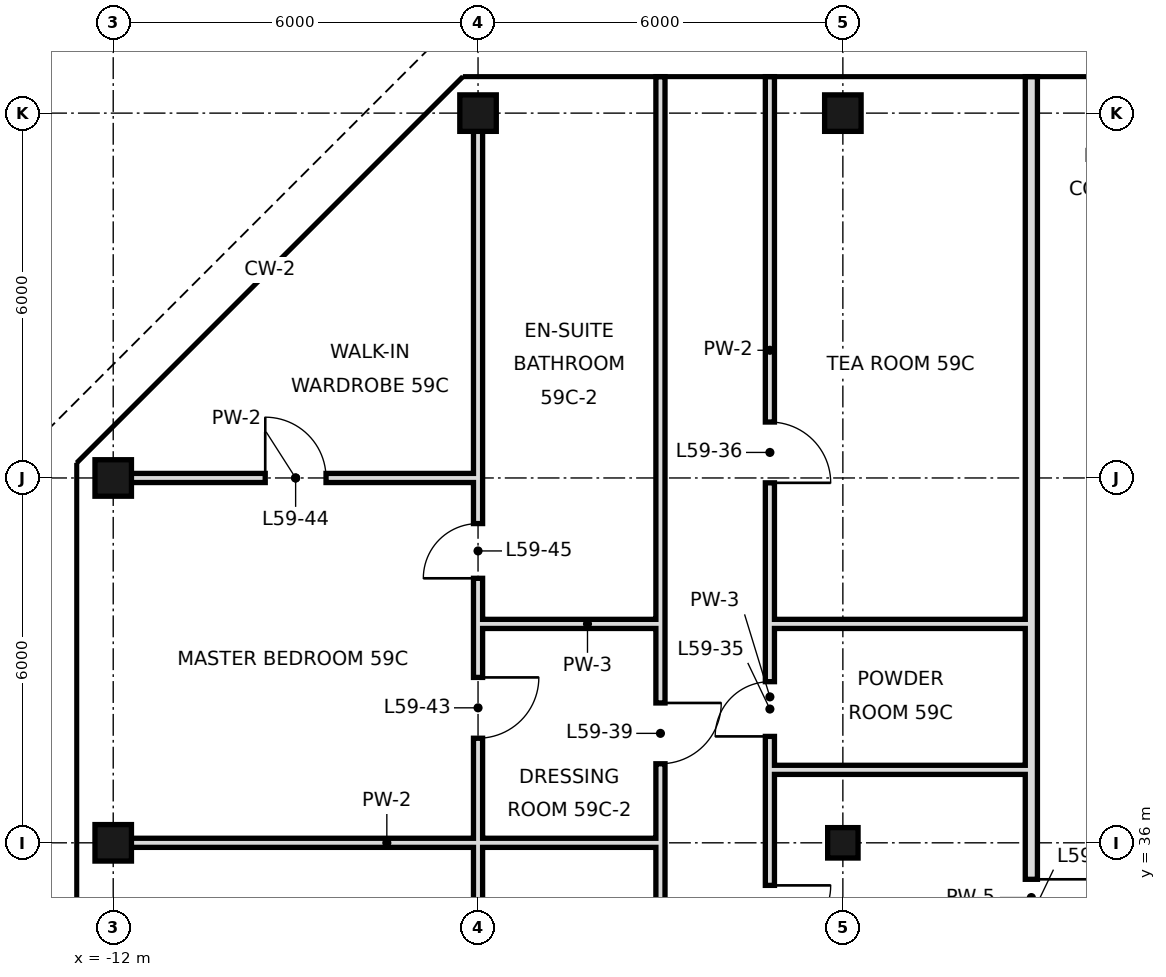
"""IFC4 building model, lengths in metres.
Left out: names, types, materials, properties, quantities, classifications, styles, units other than length and angle.
Written with IfcOpenShell. Run it as: python <this file> out.ifc"""

import sys

from ifc_helpers import new_model, si_unit, direction, frame, frame_2d, origin, origin_2d, place, context, subcontext, project, spatial, rectangle, hollow_rectangle, extrude, element, fill, save


model = new_model("IFC4")
c1 = context("Model", 3, precision=1e-05, world=origin(), true_north=direction((0.0, 1.0)))
c2 = subcontext(c1, "Body", "Model", "MODEL_VIEW")
j1 = project(units=[si_unit("LENGTHUNIT", "METRE"), si_unit("PLANEANGLEUNIT", "RADIAN")], contexts=[c1])
p1 = place(None, origin())
s1 = spatial("IfcSite", under=j1, at=p1, CompositionType="ELEMENT")
p2 = place(p1, origin())
s2 = spatial("IfcBuilding", under=s1, at=p2, CompositionType="ELEMENT")
p3 = place(p2, frame((0.0, 0.0, 250.4)))
s3 = spatial("IfcBuildingStorey", under=s2, at=p3, CompositionType="ELEMENT", Elevation=250.4)
for number, where, z_axis, x_axis in (
    (1, (-12.0, 36.0, 0.0), (0.0, 0.0, 1.0), (1.0, 0.0, 0.0)),
    (2, (-12.0, 42.0, 0.0), (0.0, 0.0, 1.0), (1.0, 0.0, 0.0)),
    (3, (-6.0, 48.0, 0.0), (0.0, 0.0, 1.0), (1.0, 0.0, 0.0)),
):
    element("IfcColumn", number, at=place(p3, frame(where, z_axis=z_axis, x_axis=x_axis)), inside=s3, PredefinedType="COLUMN", context=c2, shape_type="SweptSolid", body=[
        extrude(hollow_rectangle(XDim=0.6, YDim=0.6, WallThickness=0.028, at=origin_2d()), origin(), (0.0, 0.0, 1.0), 3.6),
    ])
p4 = place(p3, frame((0.0, 36.0, 0.0), z_axis=(0.0, 0.0, 1.0), x_axis=(1.0, 0.0, 0.0)))
e4 = element("IfcColumn", 4, at=p4, inside=s3, PredefinedType="COLUMN", context=c2, shape_type="SweptSolid", body=[
    extrude(hollow_rectangle(XDim=0.5, YDim=0.5, WallThickness=0.025, at=origin_2d()), origin(), (0.0, 0.0, 1.0), 3.6),
])
p5 = place(p3, frame((0.0, 48.0, 0.0), z_axis=(0.0, 0.0, 1.0), x_axis=(1.0, 0.0, 0.0)))
e5 = element("IfcColumn", 5, at=p5, inside=s3, PredefinedType="COLUMN", context=c2, shape_type="SweptSolid", body=[
    extrude(hollow_rectangle(XDim=0.6, YDim=0.6, WallThickness=0.028, at=origin_2d()), origin(), (0.0, 0.0, 1.0), 3.6),
])
p6 = place(p3, frame((-1.2, 21.6, 0.0), z_axis=(0.0, 0.0, 1.0), x_axis=(0.0, 1.0, 0.0)))
e6 = element("IfcWall", 6, at=p6, inside=s3, PredefinedType="PARTITIONING", context=c2, shape_type="SweptSolid", body=[
    extrude(rectangle(XDim=15.6, YDim=0.15, at=frame_2d((7.8, 0.0))), origin(), (0.0, 0.0, 1.0), 3.42),
])
p7 = place(p6, frame((12.7, 0.0, 0.0)))
e7 = element("IfcOpeningElement", 7, at=p7, cuts=e6, PredefinedType="OPENING", context=c2, shape_type="SweptSolid", body=[
    extrude(rectangle(XDim=1.0, YDim=2.4, at=frame_2d((0.5, 1.2))), frame((0.0, 0.085, 0.0), z_axis=(0.0, -1.0, 0.0), x_axis=(1.0, 0.0, 0.0)), (0.0, 0.0, 1.0), 0.17),
])
p8 = place(p6, frame((4.9, 0.0, 0.0)))
e8 = element("IfcOpeningElement", 8, at=p8, cuts=e6, PredefinedType="OPENING", context=c2, shape_type="SweptSolid", body=[
    extrude(rectangle(XDim=1.0, YDim=2.4, at=frame_2d((0.5, 1.2))), frame((0.0, 0.085, 0.0), z_axis=(0.0, -1.0, 0.0), x_axis=(1.0, 0.0, 0.0)), (0.0, 0.0, 1.0), 0.17),
])
p9 = place(p3, frame((-1.2, 39.6, 0.0), z_axis=(0.0, 0.0, 1.0), x_axis=(0.0, 1.0, 0.0)))
e9 = element("IfcWall", 9, at=p9, inside=s3, PredefinedType="PARTITIONING", context=c2, shape_type="SweptSolid", body=[
    extrude(rectangle(XDim=9.0, YDim=0.15, at=frame_2d((4.5, 0.0))), origin(), (0.0, 0.0, 1.0), 3.42),
])
p10 = place(p9, frame((2.32, 0.0, 0.0)))
e10 = element("IfcOpeningElement", 10, at=p10, cuts=e9, PredefinedType="OPENING", context=c2, shape_type="SweptSolid", body=[
    extrude(rectangle(XDim=1.0, YDim=2.4, at=frame_2d((0.5, 1.2))), frame((0.0, 0.085, 0.0), z_axis=(0.0, -1.0, 0.0), x_axis=(1.0, 0.0, 0.0)), (0.0, 0.0, 1.0), 0.17),
])
p11 = place(p3, frame((-1.2, 37.2, 0.0), z_axis=(0.0, 0.0, 1.0), x_axis=(0.0, 1.0, 0.0)))
e11 = element("IfcWall", 11, at=p11, inside=s3, PredefinedType="PARTITIONING", context=c2, shape_type="SweptSolid", body=[
    extrude(rectangle(XDim=2.4, YDim=0.15, at=frame_2d((1.2, 0.0))), origin(), (0.0, 0.0, 1.0), 3.42),
])
p12 = place(p11, frame((0.55, 0.0, 0.0)))
e12 = element("IfcOpeningElement", 12, at=p12, cuts=e11, PredefinedType="OPENING", context=c2, shape_type="SweptSolid", body=[
    extrude(rectangle(XDim=0.9, YDim=2.4, at=frame_2d((0.45, 1.2))), frame((0.0, 0.085, 0.0), z_axis=(0.0, -1.0, 0.0), x_axis=(1.0, 0.0, 0.0)), (0.0, 0.0, 1.0), 0.17),
])
p13 = place(p3, frame((-3.0, 21.6, 0.0), z_axis=(0.0, 0.0, 1.0), x_axis=(0.0, 1.0, 0.0)))
e13 = element("IfcWall", 13, at=p13, inside=s3, PredefinedType="PARTITIONING", context=c2, shape_type="SweptSolid", body=[
    extrude(rectangle(XDim=18.0, YDim=0.15, at=frame_2d((9.0, 0.0))), origin(), (0.0, 0.0, 1.0), 3.42),
])
p14 = place(p13, frame((0.88, 0.0, 0.0)))
e14 = element("IfcOpeningElement", 14, at=p14, cuts=e13, PredefinedType="OPENING", context=c2, shape_type="SweptSolid", body=[
    extrude(rectangle(XDim=1.0, YDim=2.4, at=frame_2d((0.5, 1.2))), frame((0.0, 0.085, 0.0), z_axis=(0.0, -1.0, 0.0), x_axis=(1.0, 0.0, 0.0)), (0.0, 0.0, 1.0), 0.17),
])
p15 = place(p13, frame((9.44, 0.0, 0.0)))
e15 = element("IfcOpeningElement", 15, at=p15, cuts=e13, PredefinedType="OPENING", context=c2, shape_type="SweptSolid", body=[
    extrude(rectangle(XDim=1.8, YDim=2.4, at=frame_2d((0.9, 1.2))), frame((0.0, 0.085, 0.0), z_axis=(0.0, -1.0, 0.0), x_axis=(1.0, 0.0, 0.0)), (0.0, 0.0, 1.0), 0.17),
])
p16 = place(p13, frame((15.7, 0.0, 0.0)))
e16 = element("IfcOpeningElement", 16, at=p16, cuts=e13, PredefinedType="OPENING", context=c2, shape_type="SweptSolid", body=[
    extrude(rectangle(XDim=1.0, YDim=2.4, at=frame_2d((0.5, 1.2))), frame((0.0, 0.085, 0.0), z_axis=(0.0, -1.0, 0.0), x_axis=(1.0, 0.0, 0.0)), (0.0, 0.0, 1.0), 0.17),
])
p17 = place(p3, frame((-3.0, 39.6, 0.0), z_axis=(0.0, 0.0, 1.0), x_axis=(0.0, 1.0, 0.0)))
e17 = element("IfcWall", 17, at=p17, inside=s3, PredefinedType="PARTITIONING", context=c2, shape_type="SweptSolid", body=[
    extrude(rectangle(XDim=9.0, YDim=0.15, at=frame_2d((4.5, 0.0))), origin(), (0.0, 0.0, 1.0), 3.42),
])
p18 = place(p3, frame((-6.0, 21.6, 0.0), z_axis=(0.0, 0.0, 1.0), x_axis=(0.0, 1.0, 0.0)))
e18 = element("IfcWall", 18, at=p18, inside=s3, PredefinedType="PARTITIONING", context=c2, shape_type="SweptSolid", body=[
    extrude(rectangle(XDim=18.0, YDim=0.15, at=frame_2d((9.0, 0.0))), origin(), (0.0, 0.0, 1.0), 3.42),
])
p19 = place(p18, frame((0.52, 0.0, 0.0)))
e19 = element("IfcOpeningElement", 19, at=p19, cuts=e18, PredefinedType="OPENING", context=c2, shape_type="SweptSolid", body=[
    extrude(rectangle(XDim=1.0, YDim=2.4, at=frame_2d((0.5, 1.2))), frame((0.0, 0.085, 0.0), z_axis=(0.0, -1.0, 0.0), x_axis=(1.0, 0.0, 0.0)), (0.0, 0.0, 1.0), 0.17),
])
p20 = place(p18, frame((7.5, 0.0, 0.0)))
e20 = element("IfcOpeningElement", 20, at=p20, cuts=e18, PredefinedType="OPENING", context=c2, shape_type="SweptSolid", body=[
    extrude(rectangle(XDim=1.8, YDim=2.4, at=frame_2d((0.9, 1.2))), frame((0.0, 0.085, 0.0), z_axis=(0.0, -1.0, 0.0), x_axis=(1.0, 0.0, 0.0)), (0.0, 0.0, 1.0), 0.17),
])
p21 = place(p18, frame((16.12, 0.0, 0.0)))
e21 = element("IfcOpeningElement", 21, at=p21, cuts=e18, PredefinedType="OPENING", context=c2, shape_type="SweptSolid", body=[
    extrude(rectangle(XDim=1.0, YDim=2.4, at=frame_2d((0.5, 1.2))), frame((0.0, 0.085, 0.0), z_axis=(0.0, -1.0, 0.0), x_axis=(1.0, 0.0, 0.0)), (0.0, 0.0, 1.0), 0.17),
])
p22 = place(p3, frame((-6.0, 39.6, 0.0), z_axis=(0.0, 0.0, 1.0), x_axis=(0.0, 1.0, 0.0)))
e22 = element("IfcWall", 22, at=p22, inside=s3, PredefinedType="PARTITIONING", context=c2, shape_type="SweptSolid", body=[
    extrude(rectangle(XDim=8.4, YDim=0.15, at=frame_2d((4.2, 0.0))), origin(), (0.0, 0.0, 1.0), 3.42),
])
p23 = place(p22, frame((0.75, 0.0, 0.0)))
e23 = element("IfcOpeningElement", 23, at=p23, cuts=e22, PredefinedType="OPENING", context=c2, shape_type="SweptSolid", body=[
    extrude(rectangle(XDim=0.9, YDim=2.4, at=frame_2d((0.45, 1.2))), frame((0.0, 0.085, 0.0), z_axis=(0.0, -1.0, 0.0), x_axis=(1.0, 0.0, 0.0)), (0.0, 0.0, 1.0), 0.17),
])
p24 = place(p3, frame((3.1, 21.6, 0.0), z_axis=(0.0, 0.0, 1.0), x_axis=(0.0, 1.0, 0.0)))
e24 = element("IfcWall", 24, at=p24, inside=s3, PredefinedType="SOLIDWALL", context=c2, shape_type="SweptSolid", body=[
    extrude(rectangle(XDim=27.0, YDim=0.2, at=frame_2d((13.5, 0.0))), origin(), (0.0, 0.0, 1.0), 2.72),
])
p25 = place(p24, frame((12.6, 0.0, 0.0)))
e25 = element("IfcOpeningElement", 25, at=p25, cuts=e24, PredefinedType="OPENING", context=c2, shape_type="SweptSolid", body=[
    extrude(rectangle(XDim=1.2, YDim=2.4, at=frame_2d((0.6, 1.2))), frame((0.0, 0.11, 0.0), z_axis=(0.0, -1.0, 0.0), x_axis=(1.0, 0.0, 0.0)), (0.0, 0.0, 1.0), 0.22),
])
p26 = place(p3, frame((-12.0, 36.0, 0.0), z_axis=(0.0, 0.0, 1.0), x_axis=(1.0, 0.0, 0.0)))
e26 = element("IfcWall", 26, at=p26, inside=s3, PredefinedType="PARTITIONING", context=c2, shape_type="SweptSolid", body=[
    extrude(rectangle(XDim=9.0, YDim=0.15, at=frame_2d((4.5, 0.0))), origin(), (0.0, 0.0, 1.0), 2.72),
])
p27 = place(p3, frame((-1.2, 37.2, 0.0), z_axis=(0.0, 0.0, 1.0), x_axis=(1.0, 0.0, 0.0)))
e27 = element("IfcWall", 27, at=p27, inside=s3, PredefinedType="PARTITIONING", context=c2, shape_type="SweptSolid", body=[
    extrude(rectangle(XDim=4.3, YDim=0.15, at=frame_2d((2.15, 0.0))), origin(), (0.0, 0.0, 1.0), 3.42),
])
p28 = place(p3, frame((-6.0, 39.6, 0.0), z_axis=(0.0, 0.0, 1.0), x_axis=(1.0, 0.0, 0.0)))
e28 = element("IfcWall", 28, at=p28, inside=s3, PredefinedType="PARTITIONING", context=c2, shape_type="SweptSolid", body=[
    extrude(rectangle(XDim=3.0, YDim=0.15, at=frame_2d((1.5, 0.0))), origin(), (0.0, 0.0, 1.0), 3.42),
])
p29 = place(p3, frame((-1.2, 39.6, 0.0), z_axis=(0.0, 0.0, 1.0), x_axis=(1.0, 0.0, 0.0)))
e29 = element("IfcWall", 29, at=p29, inside=s3, PredefinedType="PARTITIONING", context=c2, shape_type="SweptSolid", body=[
    extrude(rectangle(XDim=4.3, YDim=0.15, at=frame_2d((2.15, 0.0))), origin(), (0.0, 0.0, 1.0), 3.42),
])
p30 = place(p3, frame((-12.0, 42.0, 0.0), z_axis=(0.0, 0.0, 1.0), x_axis=(1.0, 0.0, 0.0)))
e30 = element("IfcWall", 30, at=p30, inside=s3, PredefinedType="PARTITIONING", context=c2, shape_type="SweptSolid", body=[
    extrude(rectangle(XDim=6.0, YDim=0.15, at=frame_2d((3.0, 0.0))), origin(), (0.0, 0.0, 1.0), 2.72),
])
p31 = place(p30, frame((2.5, 0.0, 0.0)))
e31 = element("IfcOpeningElement", 31, at=p31, cuts=e30, PredefinedType="OPENING", context=c2, shape_type="SweptSolid", body=[
    extrude(rectangle(XDim=1.0, YDim=2.4, at=frame_2d((0.5, 1.2))), frame((0.0, 0.085, 0.0), z_axis=(0.0, -1.0, 0.0), x_axis=(1.0, 0.0, 0.0)), (0.0, 0.0, 1.0), 0.17),
])
p32 = place(p7, origin())
e32 = element("IfcDoor", 32, at=p32, inside=s3, OperationType="SINGLE_SWING_RIGHT", PredefinedType="DOOR", context=c2, shape_type="SweptSolid", body=[
    extrude(rectangle(XDim=1.0, YDim=2.4, at=frame_2d((0.5, 1.2))), frame((0.0, 0.025, 0.0), z_axis=(0.0, -1.0, 0.0), x_axis=(1.0, 0.0, 0.0)), (0.0, 0.0, 1.0), 0.05),
])
fill(e7, e32)
p33 = place(p12, origin())
e33 = element("IfcDoor", 33, at=p33, inside=s3, OperationType="SINGLE_SWING_LEFT", PredefinedType="DOOR", context=c2, shape_type="SweptSolid", body=[
    extrude(rectangle(XDim=0.9, YDim=2.4, at=frame_2d((0.45, 1.2))), frame((0.0, 0.025, 0.0), z_axis=(0.0, -1.0, 0.0), x_axis=(1.0, 0.0, 0.0)), (0.0, 0.0, 1.0), 0.05),
])
fill(e12, e33)
p34 = place(p10, frame((1.0, 0.0, 0.0), z_axis=(0.0, 0.0, 1.0), x_axis=(-1.0, 0.0, 0.0)))
e34 = element("IfcDoor", 34, at=p34, inside=s3, OperationType="SINGLE_SWING_RIGHT", PredefinedType="DOOR", context=c2, shape_type="SweptSolid", body=[
    extrude(rectangle(XDim=1.0, YDim=2.4, at=frame_2d((0.5, 1.2))), frame((0.0, 0.025, 0.0), z_axis=(0.0, -1.0, 0.0), x_axis=(1.0, 0.0, 0.0)), (0.0, 0.0, 1.0), 0.05),
])
fill(e10, e34)
p35 = place(p16, origin())
e35 = element("IfcDoor", 35, at=p35, inside=s3, OperationType="SINGLE_SWING_RIGHT", PredefinedType="DOOR", context=c2, shape_type="SweptSolid", body=[
    extrude(rectangle(XDim=1.0, YDim=2.4, at=frame_2d((0.5, 1.2))), frame((0.0, 0.025, 0.0), z_axis=(0.0, -1.0, 0.0), x_axis=(1.0, 0.0, 0.0)), (0.0, 0.0, 1.0), 0.05),
])
fill(e16, e35)
p36 = place(p21, origin())
e36 = element("IfcDoor", 36, at=p36, inside=s3, OperationType="SINGLE_SWING_RIGHT", PredefinedType="DOOR", context=c2, shape_type="SweptSolid", body=[
    extrude(rectangle(XDim=1.0, YDim=2.4, at=frame_2d((0.5, 1.2))), frame((0.0, 0.025, 0.0), z_axis=(0.0, -1.0, 0.0), x_axis=(1.0, 0.0, 0.0)), (0.0, 0.0, 1.0), 0.05),
])
fill(e21, e36)
p37 = place(p31, origin())
e37 = element("IfcDoor", 37, at=p37, inside=s3, OperationType="SINGLE_SWING_LEFT", PredefinedType="DOOR", context=c2, shape_type="SweptSolid", body=[
    extrude(rectangle(XDim=1.0, YDim=2.4, at=frame_2d((0.5, 1.2))), frame((0.0, 0.025, 0.0), z_axis=(0.0, -1.0, 0.0), x_axis=(1.0, 0.0, 0.0)), (0.0, 0.0, 1.0), 0.05),
])
fill(e31, e37)
p38 = place(p23, origin())
e38 = element("IfcDoor", 38, at=p38, inside=s3, OperationType="SINGLE_SWING_LEFT", PredefinedType="DOOR", context=c2, shape_type="SweptSolid", body=[
    extrude(rectangle(XDim=0.9, YDim=2.4, at=frame_2d((0.45, 1.2))), frame((0.0, 0.025, 0.0), z_axis=(0.0, -1.0, 0.0), x_axis=(1.0, 0.0, 0.0)), (0.0, 0.0, 1.0), 0.05),
])
fill(e23, e38)
p39 = place(p25, origin())
e39 = element("IfcDoor", 39, at=p39, inside=s3, OperationType="SINGLE_SWING_RIGHT", PredefinedType="DOOR", context=c2, shape_type="SweptSolid", body=[
    extrude(rectangle(XDim=1.2, YDim=2.4, at=frame_2d((0.6, 1.2))), frame((0.0, 0.025, 0.0), z_axis=(0.0, -1.0, 0.0), x_axis=(1.0, 0.0, 0.0)), (0.0, 0.0, 1.0), 0.05),
])
fill(e25, e39)
save(model, sys.argv[1])
